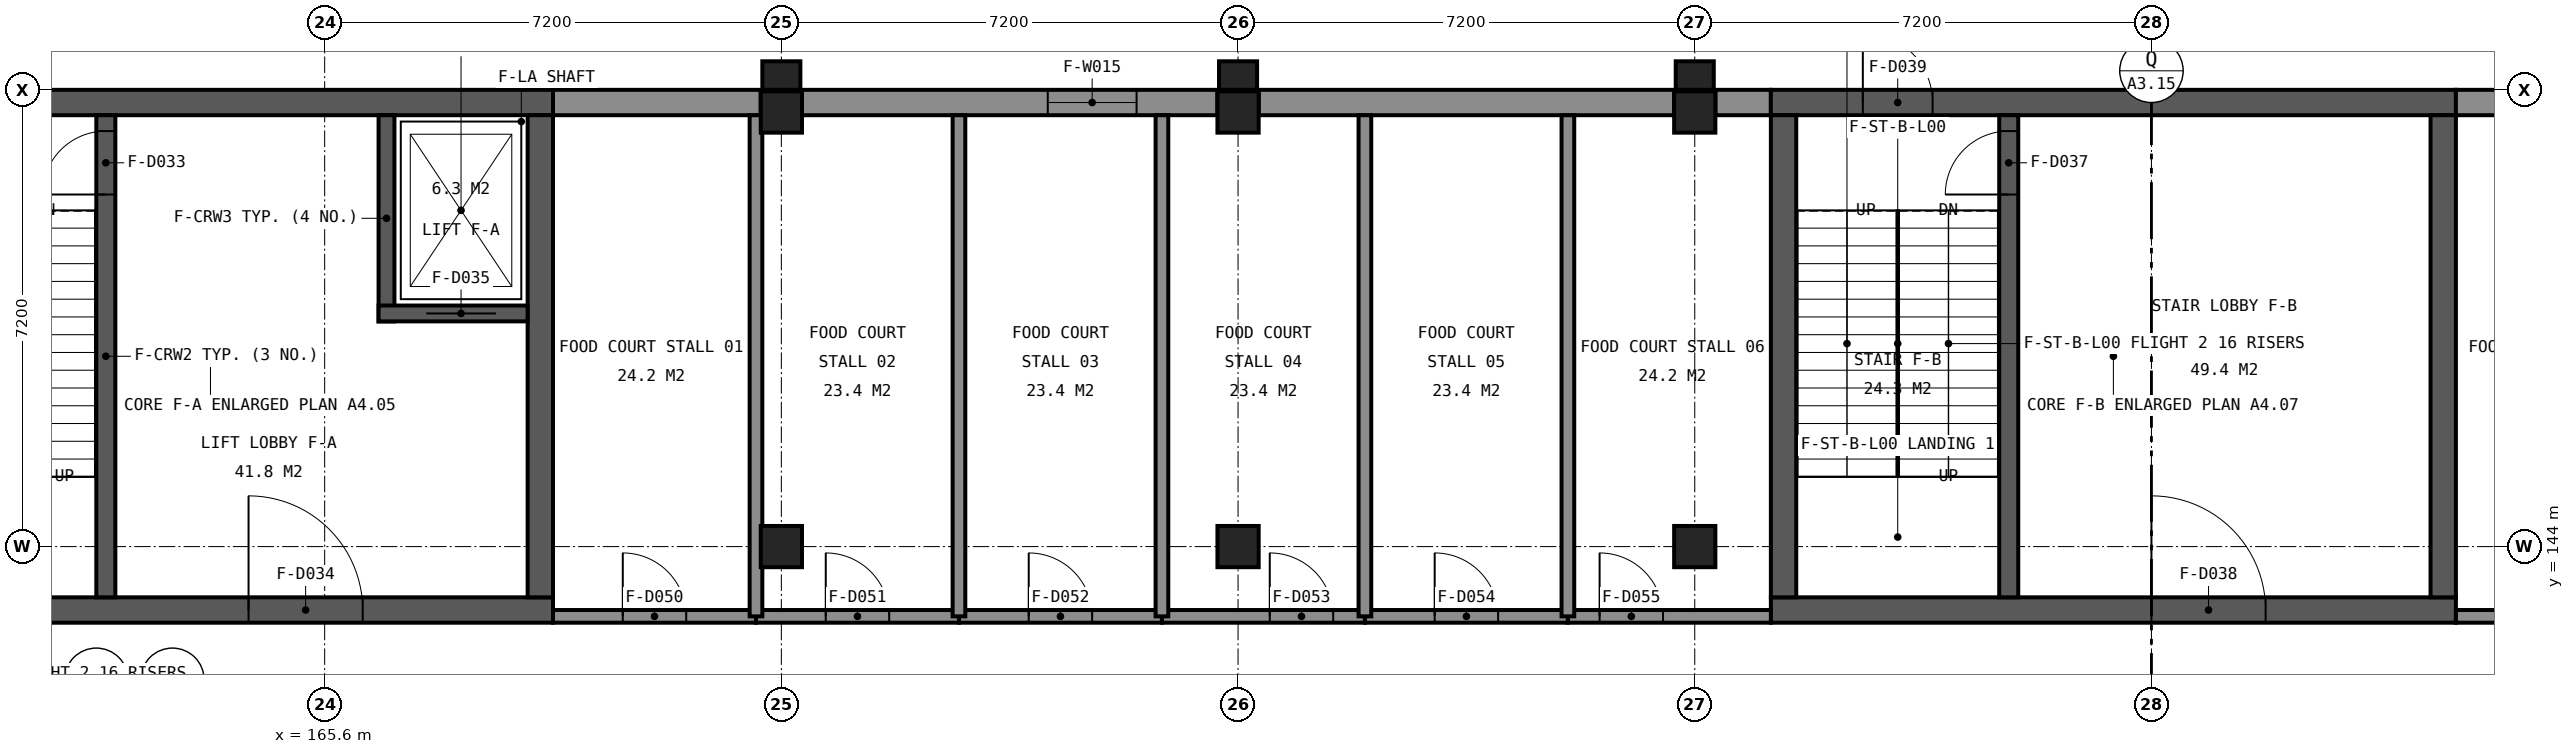
"""IFC4 building model, lengths in metres.
Left out: names, types, materials, properties, quantities, classifications, styles, units other than length and angle.
Written with IfcOpenShell. Run it as: python <this file> out.ifc"""

import sys

from ifc_helpers import new_model, si_unit, direction, frame, frame_2d, origin, origin_2d, place, context, subcontext, project, spatial, rectangle, extrude, element, fill, save


model = new_model("IFC4")
c1 = context("Model", 3, precision=1e-05, world=origin(), true_north=direction((0.0, 1.0)))
c2 = subcontext(c1, "Body", "Model", "MODEL_VIEW")
j1 = project(units=[si_unit("LENGTHUNIT", "METRE"), si_unit("PLANEANGLEUNIT", "RADIAN")], contexts=[c1])
p1 = place(None, origin())
s1 = spatial("IfcSite", under=j1, at=p1, CompositionType="ELEMENT")
p2 = place(p1, origin())
s2 = spatial("IfcBuilding", under=s1, at=p2, CompositionType="ELEMENT")
p3 = place(p2, frame((0.0, 0.0, 4.8)))
s3 = spatial("IfcBuildingStorey", under=s2, at=p3, CompositionType="ELEMENT", Elevation=4.8)
for number, where, z_axis, x_axis in (
    (1, (172.8, 144.0, 0.0), (0.0, 0.0, 1.0), (1.0, 0.0, 0.0)),
    (2, (180.0, 144.0, 0.0), (0.0, 0.0, 1.0), (1.0, 0.0, 0.0)),
    (3, (187.2, 144.0, 0.0), (0.0, 0.0, 1.0), (1.0, 0.0, 0.0)),
    (4, (172.8, 150.85, 0.0), (0.0, 0.0, 1.0), (1.0, 0.0, 0.0)),
    (5, (180.0, 150.85, 0.0), (0.0, 0.0, 1.0), (1.0, 0.0, 0.0)),
    (6, (187.2, 150.85, 0.0), (0.0, 0.0, 1.0), (1.0, 0.0, 0.0)),
):
    element("IfcColumn", number, at=place(p3, frame(where, z_axis=z_axis, x_axis=x_axis)), inside=s3, PredefinedType="COLUMN", context=c2, shape_type="SweptSolid", body=[
        extrude(rectangle(XDim=0.65, YDim=0.65, at=origin_2d()), origin(), (0.0, 0.0, 1.0), 4.8),
    ])
p4 = place(p3, frame((158.4, 151.0, 0.0), z_axis=(0.0, 0.0, 1.0), x_axis=(1.0, 0.0, 0.0)))
e7 = element("IfcWall", 7, at=p4, inside=s3, PredefinedType="SHEAR", context=c2, shape_type="SweptSolid", body=[
    extrude(rectangle(XDim=10.8, YDim=0.4, at=frame_2d((5.4, 0.0))), origin(), (0.0, 0.0, 1.0), 4.55),
])
p5 = place(p4, frame((1.45, 0.0, 0.0)))
e8 = element("IfcOpeningElement", 8, at=p5, cuts=e7, PredefinedType="OPENING", context=c2, shape_type="SweptSolid", body=[
    extrude(rectangle(XDim=1.1, YDim=2.1, at=frame_2d((0.55, 1.05))), frame((0.0, 0.21, 0.0), z_axis=(0.0, -1.0, 0.0), x_axis=(1.0, 0.0, 0.0)), (0.0, 0.0, 1.0), 0.42),
])
p6 = place(p3, frame((169.2, 151.0, 0.0), z_axis=(0.0, 0.0, 1.0), x_axis=(1.0, 0.0, 0.0)))
e9 = element("IfcWall", 9, at=p6, inside=s3, PredefinedType="SOLIDWALL", context=c2, shape_type="SweptSolid", body=[
    extrude(rectangle(XDim=3.275, YDim=0.4, at=frame_2d((1.638, 0.0))), origin(), (0.0, 0.0, 1.0), 3.95),
])
p7 = place(p3, frame((173.125, 151.0, 0.0), z_axis=(0.0, 0.0, 1.0), x_axis=(1.0, 0.0, 0.0)))
e10 = element("IfcWall", 10, at=p7, inside=s3, PredefinedType="SOLIDWALL", context=c2, shape_type="SweptSolid", body=[
    extrude(rectangle(XDim=6.55, YDim=0.4, at=frame_2d((3.275, 0.0))), origin(), (0.0, 0.0, 1.0), 3.95),
])
p8 = place(p7, frame((3.875, 0.0, 1.0)))
e11 = element("IfcOpeningElement", 11, at=p8, cuts=e10, PredefinedType="OPENING", context=c2, shape_type="SweptSolid", body=[
    extrude(rectangle(XDim=1.4, YDim=1.8, at=frame_2d((0.7, 0.9))), frame((0.0, 0.21, 0.0), z_axis=(0.0, -1.0, 0.0), x_axis=(1.0, 0.0, 0.0)), (0.0, 0.0, 1.0), 0.42),
])
p9 = place(p3, frame((180.325, 151.0, 0.0), z_axis=(0.0, 0.0, 1.0), x_axis=(1.0, 0.0, 0.0)))
e12 = element("IfcWall", 12, at=p9, inside=s3, PredefinedType="SOLIDWALL", context=c2, shape_type="SweptSolid", body=[
    extrude(rectangle(XDim=6.55, YDim=0.4, at=frame_2d((3.275, 0.0))), origin(), (0.0, 0.0, 1.0), 3.95),
])
p10 = place(p3, frame((187.525, 151.0, 0.0), z_axis=(0.0, 0.0, 1.0), x_axis=(1.0, 0.0, 0.0)))
e13 = element("IfcWall", 13, at=p10, inside=s3, PredefinedType="SOLIDWALL", context=c2, shape_type="SweptSolid", body=[
    extrude(rectangle(XDim=0.875, YDim=0.4, at=frame_2d((0.438, 0.0))), origin(), (0.0, 0.0, 1.0), 3.95),
])
p11 = place(p3, frame((188.4, 151.0, 0.0), z_axis=(0.0, 0.0, 1.0), x_axis=(1.0, 0.0, 0.0)))
e14 = element("IfcWall", 14, at=p11, inside=s3, PredefinedType="SHEAR", context=c2, shape_type="SweptSolid", body=[
    extrude(rectangle(XDim=10.8, YDim=0.4, at=frame_2d((5.4, 0.0))), origin(), (0.0, 0.0, 1.0), 4.55),
])
p12 = place(p11, frame((1.45, 0.0, 0.0)))
e15 = element("IfcOpeningElement", 15, at=p12, cuts=e14, PredefinedType="OPENING", context=c2, shape_type="SweptSolid", body=[
    extrude(rectangle(XDim=1.1, YDim=2.1, at=frame_2d((0.55, 1.05))), frame((0.0, 0.21, 0.0), z_axis=(0.0, -1.0, 0.0), x_axis=(1.0, 0.0, 0.0)), (0.0, 0.0, 1.0), 0.42),
])
p13 = place(p3, frame((199.2, 151.0, 0.0), z_axis=(0.0, 0.0, 1.0), x_axis=(1.0, 0.0, 0.0)))
e16 = element("IfcWall", 16, at=p13, inside=s3, PredefinedType="SOLIDWALL", context=c2, shape_type="SweptSolid", body=[
    extrude(rectangle(XDim=2.075, YDim=0.4, at=frame_2d((1.038, 0.0))), origin(), (0.0, 0.0, 1.0), 3.95),
])
p14 = place(p3, frame((158.4, 143.0, 0.0), z_axis=(0.0, 0.0, 1.0), x_axis=(1.0, 0.0, 0.0)))
e17 = element("IfcWall", 17, at=p14, inside=s3, PredefinedType="SHEAR", context=c2, shape_type="SweptSolid", body=[
    extrude(rectangle(XDim=10.8, YDim=0.4, at=frame_2d((5.4, 0.0))), origin(), (0.0, 0.0, 1.0), 4.55),
])
p15 = place(p14, frame((6.0, 0.0, 0.0)))
e18 = element("IfcOpeningElement", 18, at=p15, cuts=e17, PredefinedType="OPENING", context=c2, shape_type="SweptSolid", body=[
    extrude(rectangle(XDim=1.8, YDim=2.1, at=frame_2d((0.9, 1.05))), frame((0.0, 0.21, 0.0), z_axis=(0.0, -1.0, 0.0), x_axis=(1.0, 0.0, 0.0)), (0.0, 0.0, 1.0), 0.42),
])
p16 = place(p3, frame((169.0, 143.2, 0.0), z_axis=(0.0, 0.0, 1.0), x_axis=(0.0, 1.0, 0.0)))
e19 = element("IfcWall", 19, at=p16, inside=s3, PredefinedType="SHEAR", context=c2, shape_type="SweptSolid", body=[
    extrude(rectangle(XDim=7.6, YDim=0.4, at=frame_2d((3.8, 0.0))), origin(), (0.0, 0.0, 1.0), 4.55),
])
p17 = place(p3, frame((162.15, 143.2, 0.0), z_axis=(0.0, 0.0, 1.0), x_axis=(0.0, 1.0, 0.0)))
e20 = element("IfcWall", 20, at=p17, inside=s3, PredefinedType="SHEAR", context=c2, shape_type="SweptSolid", body=[
    extrude(rectangle(XDim=7.6, YDim=0.3, at=frame_2d((3.8, 0.0))), origin(), (0.0, 0.0, 1.0), 4.55),
])
p18 = place(p17, frame((6.35, 0.0, 0.0)))
e21 = element("IfcOpeningElement", 21, at=p18, cuts=e20, PredefinedType="OPENING", context=c2, shape_type="SweptSolid", body=[
    extrude(rectangle(XDim=1.0, YDim=2.1, at=frame_2d((0.5, 1.05))), frame((0.0, 0.16, 0.0), z_axis=(0.0, -1.0, 0.0), x_axis=(1.0, 0.0, 0.0)), (0.0, 0.0, 1.0), 0.32),
])
p19 = place(p3, frame((166.575, 147.55, 0.0), z_axis=(0.0, 0.0, 1.0), x_axis=(0.0, 1.0, 0.0)))
e22 = element("IfcWall", 22, at=p19, inside=s3, PredefinedType="SHEAR", context=c2, shape_type="SweptSolid", body=[
    extrude(rectangle(XDim=3.25, YDim=0.25, at=frame_2d((1.625, 0.0))), origin(), (0.0, 0.0, 1.0), 4.55),
])
p20 = place(p3, frame((166.45, 147.675, 0.0), z_axis=(0.0, 0.0, 1.0), x_axis=(1.0, 0.0, 0.0)))
e23 = element("IfcWall", 23, at=p20, inside=s3, PredefinedType="SHEAR", context=c2, shape_type="SweptSolid", body=[
    extrude(rectangle(XDim=2.35, YDim=0.25, at=frame_2d((1.175, 0.0))), origin(), (0.0, 0.0, 1.0), 4.55),
])
p21 = place(p20, frame((0.75, 0.0, 0.0)))
e24 = element("IfcOpeningElement", 24, at=p21, cuts=e23, PredefinedType="OPENING", context=c2, shape_type="SweptSolid", body=[
    extrude(rectangle(XDim=1.1, YDim=2.1, at=frame_2d((0.55, 1.05))), frame((0.0, 0.135, 0.0), z_axis=(0.0, -1.0, 0.0), x_axis=(1.0, 0.0, 0.0)), (0.0, 0.0, 1.0), 0.27),
])
p22 = place(p3, frame((188.4, 143.0, 0.0), z_axis=(0.0, 0.0, 1.0), x_axis=(1.0, 0.0, 0.0)))
e25 = element("IfcWall", 25, at=p22, inside=s3, PredefinedType="SHEAR", context=c2, shape_type="SweptSolid", body=[
    extrude(rectangle(XDim=10.8, YDim=0.4, at=frame_2d((5.4, 0.0))), origin(), (0.0, 0.0, 1.0), 4.55),
])
p23 = place(p22, frame((6.0, 0.0, 0.0)))
e26 = element("IfcOpeningElement", 26, at=p23, cuts=e25, PredefinedType="OPENING", context=c2, shape_type="SweptSolid", body=[
    extrude(rectangle(XDim=1.8, YDim=2.1, at=frame_2d((0.9, 1.05))), frame((0.0, 0.21, 0.0), z_axis=(0.0, -1.0, 0.0), x_axis=(1.0, 0.0, 0.0)), (0.0, 0.0, 1.0), 0.42),
])
for number, where, z_axis, x_axis in (
    (27, (188.6, 143.2, 0.0), (0.0, 0.0, 1.0), (0.0, 1.0, 0.0)),
    (28, (199.0, 143.2, 0.0), (0.0, 0.0, 1.0), (0.0, 1.0, 0.0)),
):
    element("IfcWall", number, at=place(p3, frame(where, z_axis=z_axis, x_axis=x_axis)), inside=s3, PredefinedType="SHEAR", context=c2, shape_type="SweptSolid", body=[
        extrude(rectangle(XDim=7.6, YDim=0.4, at=frame_2d((3.8, 0.0))), origin(), (0.0, 0.0, 1.0), 4.55),
    ])
p24 = place(p3, frame((192.15, 143.2, 0.0), z_axis=(0.0, 0.0, 1.0), x_axis=(0.0, 1.0, 0.0)))
e29 = element("IfcWall", 29, at=p24, inside=s3, PredefinedType="SHEAR", context=c2, shape_type="SweptSolid", body=[
    extrude(rectangle(XDim=7.6, YDim=0.3, at=frame_2d((3.8, 0.0))), origin(), (0.0, 0.0, 1.0), 4.55),
])
p25 = place(p24, frame((6.35, 0.0, 0.0)))
e30 = element("IfcOpeningElement", 30, at=p25, cuts=e29, PredefinedType="OPENING", context=c2, shape_type="SweptSolid", body=[
    extrude(rectangle(XDim=1.0, YDim=2.1, at=frame_2d((0.5, 1.05))), frame((0.0, 0.16, 0.0), z_axis=(0.0, -1.0, 0.0), x_axis=(1.0, 0.0, 0.0)), (0.0, 0.0, 1.0), 0.32),
])
for number, where, z_axis, x_axis in (
    (31, (172.8, 151.425, 0.0), (0.0, 0.0, 1.0), (1.0, 0.0, 0.0)),
    (32, (180.0, 151.425, 0.0), (0.0, 0.0, 1.0), (1.0, 0.0, 0.0)),
    (33, (187.2, 151.425, 0.0), (0.0, 0.0, 1.0), (1.0, 0.0, 0.0)),
):
    element("IfcColumn", number, at=place(p3, frame(where, z_axis=z_axis, x_axis=x_axis)), inside=s3, PredefinedType="PILASTER", context=c2, shape_type="SweptSolid", body=[
        extrude(rectangle(XDim=0.6, YDim=0.45, at=origin_2d()), origin(), (0.0, 0.0, 1.0), 4.8),
    ])
p26 = place(p3, frame((169.2, 142.9, 0.0), z_axis=(0.0, 0.0, 1.0), x_axis=(1.0, 0.0, 0.0)))
e34 = element("IfcWall", 34, at=p26, inside=s3, PredefinedType="PARTITIONING", context=c2, shape_type="SweptSolid", body=[
    extrude(rectangle(XDim=3.2, YDim=0.2, at=frame_2d((1.6, 0.0))), origin(), (0.0, 0.0, 1.0), 3.95),
])
p27 = place(p26, frame((1.1, 0.0, 0.0)))
e35 = element("IfcOpeningElement", 35, at=p27, cuts=e34, PredefinedType="OPENING", context=c2, shape_type="SweptSolid", body=[
    extrude(rectangle(XDim=1.0, YDim=2.1, at=frame_2d((0.5, 1.05))), frame((0.0, 0.11, 0.0), z_axis=(0.0, -1.0, 0.0), x_axis=(1.0, 0.0, 0.0)), (0.0, 0.0, 1.0), 0.22),
])
p28 = place(p3, frame((172.4, 142.9, 0.0), z_axis=(0.0, 0.0, 1.0), x_axis=(1.0, 0.0, 0.0)))
e36 = element("IfcWall", 36, at=p28, inside=s3, PredefinedType="PARTITIONING", context=c2, shape_type="SweptSolid", body=[
    extrude(rectangle(XDim=3.2, YDim=0.2, at=frame_2d((1.6, 0.0))), origin(), (0.0, 0.0, 1.0), 3.95),
])
p29 = place(p28, frame((1.1, 0.0, 0.0)))
e37 = element("IfcOpeningElement", 37, at=p29, cuts=e36, PredefinedType="OPENING", context=c2, shape_type="SweptSolid", body=[
    extrude(rectangle(XDim=1.0, YDim=2.1, at=frame_2d((0.5, 1.05))), frame((0.0, 0.11, 0.0), z_axis=(0.0, -1.0, 0.0), x_axis=(1.0, 0.0, 0.0)), (0.0, 0.0, 1.0), 0.22),
])
p30 = place(p3, frame((175.6, 142.9, 0.0), z_axis=(0.0, 0.0, 1.0), x_axis=(1.0, 0.0, 0.0)))
e38 = element("IfcWall", 38, at=p30, inside=s3, PredefinedType="PARTITIONING", context=c2, shape_type="SweptSolid", body=[
    extrude(rectangle(XDim=3.2, YDim=0.2, at=frame_2d((1.6, 0.0))), origin(), (0.0, 0.0, 1.0), 3.95),
])
p31 = place(p30, frame((1.1, 0.0, 0.0)))
e39 = element("IfcOpeningElement", 39, at=p31, cuts=e38, PredefinedType="OPENING", context=c2, shape_type="SweptSolid", body=[
    extrude(rectangle(XDim=1.0, YDim=2.1, at=frame_2d((0.5, 1.05))), frame((0.0, 0.11, 0.0), z_axis=(0.0, -1.0, 0.0), x_axis=(1.0, 0.0, 0.0)), (0.0, 0.0, 1.0), 0.22),
])
p32 = place(p3, frame((178.8, 142.9, 0.0), z_axis=(0.0, 0.0, 1.0), x_axis=(1.0, 0.0, 0.0)))
e40 = element("IfcWall", 40, at=p32, inside=s3, PredefinedType="PARTITIONING", context=c2, shape_type="SweptSolid", body=[
    extrude(rectangle(XDim=3.2, YDim=0.2, at=frame_2d((1.6, 0.0))), origin(), (0.0, 0.0, 1.0), 3.95),
])
p33 = place(p32, frame((1.7, 0.0, 0.0)))
e41 = element("IfcOpeningElement", 41, at=p33, cuts=e40, PredefinedType="OPENING", context=c2, shape_type="SweptSolid", body=[
    extrude(rectangle(XDim=1.0, YDim=2.1, at=frame_2d((0.5, 1.05))), frame((0.0, 0.11, 0.0), z_axis=(0.0, -1.0, 0.0), x_axis=(1.0, 0.0, 0.0)), (0.0, 0.0, 1.0), 0.22),
])
p34 = place(p3, frame((182.0, 142.9, 0.0), z_axis=(0.0, 0.0, 1.0), x_axis=(1.0, 0.0, 0.0)))
e42 = element("IfcWall", 42, at=p34, inside=s3, PredefinedType="PARTITIONING", context=c2, shape_type="SweptSolid", body=[
    extrude(rectangle(XDim=3.2, YDim=0.2, at=frame_2d((1.6, 0.0))), origin(), (0.0, 0.0, 1.0), 3.95),
])
p35 = place(p34, frame((1.1, 0.0, 0.0)))
e43 = element("IfcOpeningElement", 43, at=p35, cuts=e42, PredefinedType="OPENING", context=c2, shape_type="SweptSolid", body=[
    extrude(rectangle(XDim=1.0, YDim=2.1, at=frame_2d((0.5, 1.05))), frame((0.0, 0.11, 0.0), z_axis=(0.0, -1.0, 0.0), x_axis=(1.0, 0.0, 0.0)), (0.0, 0.0, 1.0), 0.22),
])
p36 = place(p3, frame((185.2, 142.9, 0.0), z_axis=(0.0, 0.0, 1.0), x_axis=(1.0, 0.0, 0.0)))
e44 = element("IfcWall", 44, at=p36, inside=s3, PredefinedType="PARTITIONING", context=c2, shape_type="SweptSolid", body=[
    extrude(rectangle(XDim=3.2, YDim=0.2, at=frame_2d((1.6, 0.0))), origin(), (0.0, 0.0, 1.0), 3.95),
])
p37 = place(p36, frame((0.5, 0.0, 0.0)))
e45 = element("IfcOpeningElement", 45, at=p37, cuts=e44, PredefinedType="OPENING", context=c2, shape_type="SweptSolid", body=[
    extrude(rectangle(XDim=1.0, YDim=2.1, at=frame_2d((0.5, 1.05))), frame((0.0, 0.11, 0.0), z_axis=(0.0, -1.0, 0.0), x_axis=(1.0, 0.0, 0.0)), (0.0, 0.0, 1.0), 0.22),
])
p38 = place(p3, frame((199.2, 142.9, 0.0), z_axis=(0.0, 0.0, 1.0), x_axis=(1.0, 0.0, 0.0)))
e46 = element("IfcWall", 46, at=p38, inside=s3, PredefinedType="PARTITIONING", context=c2, shape_type="SweptSolid", body=[
    extrude(rectangle(XDim=3.4, YDim=0.2, at=frame_2d((1.7, 0.0))), origin(), (0.0, 0.0, 1.0), 3.95),
])
p39 = place(p38, frame((0.9, 0.0, 0.0)))
e47 = element("IfcOpeningElement", 47, at=p39, cuts=e46, PredefinedType="OPENING", context=c2, shape_type="SweptSolid", body=[
    extrude(rectangle(XDim=1.0, YDim=2.1, at=frame_2d((0.5, 1.05))), frame((0.0, 0.11, 0.0), z_axis=(0.0, -1.0, 0.0), x_axis=(1.0, 0.0, 0.0)), (0.0, 0.0, 1.0), 0.22),
])
for number, where, z_axis, x_axis in (
    (48, (172.4, 142.9, 0.0), (0.0, 0.0, 1.0), (0.0, 1.0, 0.0)),
    (49, (175.6, 142.9, 0.0), (0.0, 0.0, 1.0), (0.0, 1.0, 0.0)),
    (50, (178.8, 142.9, 0.0), (0.0, 0.0, 1.0), (0.0, 1.0, 0.0)),
    (51, (182.0, 142.9, 0.0), (0.0, 0.0, 1.0), (0.0, 1.0, 0.0)),
    (52, (185.2, 142.9, 0.0), (0.0, 0.0, 1.0), (0.0, 1.0, 0.0)),
):
    element("IfcWall", number, at=place(p3, frame(where, z_axis=z_axis, x_axis=x_axis)), inside=s3, PredefinedType="PARTITIONING", context=c2, shape_type="SweptSolid", body=[
        extrude(rectangle(XDim=7.9, YDim=0.2, at=frame_2d((3.95, 0.0))), origin(), (0.0, 0.0, 1.0), 3.95),
    ])
p40 = place(p8, origin())
e53 = element("IfcWindow", 53, at=p40, inside=s3, PartitioningType="SINGLE_PANEL", PredefinedType="WINDOW", context=c2, shape_type="SweptSolid", body=[
    extrude(rectangle(XDim=1.4, YDim=1.8, at=frame_2d((0.7, 0.9))), frame((0.0, -0.09, 0.0), z_axis=(0.0, -1.0, 0.0), x_axis=(1.0, 0.0, 0.0)), (0.0, 0.0, 1.0), 0.06),
])
fill(e11, e53)
p41 = place(p18, origin())
e54 = element("IfcDoor", 54, at=p41, inside=s3, OperationType="NOTDEFINED", PredefinedType="DOOR", context=c2, shape_type="SweptSolid", body=[
    extrude(rectangle(XDim=1.0, YDim=2.1, at=frame_2d((0.5, 1.05))), frame((0.0, 0.025, 0.0), z_axis=(0.0, -1.0, 0.0), x_axis=(1.0, 0.0, 0.0)), (0.0, 0.0, 1.0), 0.05),
])
fill(e21, e54)
p42 = place(p15, origin())
e55 = element("IfcDoor", 55, at=p42, inside=s3, OperationType="NOTDEFINED", PredefinedType="DOOR", context=c2, shape_type="SweptSolid", body=[
    extrude(rectangle(XDim=1.8, YDim=2.1, at=frame_2d((0.9, 1.05))), frame((0.0, 0.025, 0.0), z_axis=(0.0, -1.0, 0.0), x_axis=(1.0, 0.0, 0.0)), (0.0, 0.0, 1.0), 0.05),
])
fill(e18, e55)
p43 = place(p21, origin())
e56 = element("IfcDoor", 56, at=p43, inside=s3, OperationType="SLIDING_TO_LEFT", PredefinedType="DOOR", context=c2, shape_type="SweptSolid", body=[
    extrude(rectangle(XDim=1.1, YDim=2.1, at=frame_2d((0.55, 1.05))), frame((0.0, 0.025, 0.0), z_axis=(0.0, -1.0, 0.0), x_axis=(1.0, 0.0, 0.0)), (0.0, 0.0, 1.0), 0.05),
])
fill(e24, e56)
p44 = place(p25, origin())
e57 = element("IfcDoor", 57, at=p44, inside=s3, OperationType="NOTDEFINED", PredefinedType="DOOR", context=c2, shape_type="SweptSolid", body=[
    extrude(rectangle(XDim=1.0, YDim=2.1, at=frame_2d((0.5, 1.05))), frame((0.0, 0.025, 0.0), z_axis=(0.0, -1.0, 0.0), x_axis=(1.0, 0.0, 0.0)), (0.0, 0.0, 1.0), 0.05),
])
fill(e30, e57)
p45 = place(p23, origin())
e58 = element("IfcDoor", 58, at=p45, inside=s3, OperationType="NOTDEFINED", PredefinedType="DOOR", context=c2, shape_type="SweptSolid", body=[
    extrude(rectangle(XDim=1.8, YDim=2.1, at=frame_2d((0.9, 1.05))), frame((0.0, 0.025, 0.0), z_axis=(0.0, -1.0, 0.0), x_axis=(1.0, 0.0, 0.0)), (0.0, 0.0, 1.0), 0.05),
])
fill(e26, e58)
p46 = place(p12, origin())
e59 = element("IfcDoor", 59, at=p46, inside=s3, OperationType="NOTDEFINED", PredefinedType="DOOR", context=c2, shape_type="SweptSolid", body=[
    extrude(rectangle(XDim=1.1, YDim=2.1, at=frame_2d((0.55, 1.05))), frame((0.0, 0.025, 0.0), z_axis=(0.0, -1.0, 0.0), x_axis=(1.0, 0.0, 0.0)), (0.0, 0.0, 1.0), 0.05),
])
fill(e15, e59)
p47 = place(p27, origin())
e60 = element("IfcDoor", 60, at=p47, inside=s3, OperationType="NOTDEFINED", PredefinedType="DOOR", context=c2, shape_type="SweptSolid", body=[
    extrude(rectangle(XDim=1.0, YDim=2.1, at=frame_2d((0.5, 1.05))), frame((0.0, 0.025, 0.0), z_axis=(0.0, -1.0, 0.0), x_axis=(1.0, 0.0, 0.0)), (0.0, 0.0, 1.0), 0.05),
])
fill(e35, e60)
p48 = place(p29, origin())
e61 = element("IfcDoor", 61, at=p48, inside=s3, OperationType="NOTDEFINED", PredefinedType="DOOR", context=c2, shape_type="SweptSolid", body=[
    extrude(rectangle(XDim=1.0, YDim=2.1, at=frame_2d((0.5, 1.05))), frame((0.0, 0.025, 0.0), z_axis=(0.0, -1.0, 0.0), x_axis=(1.0, 0.0, 0.0)), (0.0, 0.0, 1.0), 0.05),
])
fill(e37, e61)
p49 = place(p31, origin())
e62 = element("IfcDoor", 62, at=p49, inside=s3, OperationType="NOTDEFINED", PredefinedType="DOOR", context=c2, shape_type="SweptSolid", body=[
    extrude(rectangle(XDim=1.0, YDim=2.1, at=frame_2d((0.5, 1.05))), frame((0.0, 0.025, 0.0), z_axis=(0.0, -1.0, 0.0), x_axis=(1.0, 0.0, 0.0)), (0.0, 0.0, 1.0), 0.05),
])
fill(e39, e62)
p50 = place(p33, origin())
e63 = element("IfcDoor", 63, at=p50, inside=s3, OperationType="NOTDEFINED", PredefinedType="DOOR", context=c2, shape_type="SweptSolid", body=[
    extrude(rectangle(XDim=1.0, YDim=2.1, at=frame_2d((0.5, 1.05))), frame((0.0, 0.025, 0.0), z_axis=(0.0, -1.0, 0.0), x_axis=(1.0, 0.0, 0.0)), (0.0, 0.0, 1.0), 0.05),
])
fill(e41, e63)
p51 = place(p35, origin())
e64 = element("IfcDoor", 64, at=p51, inside=s3, OperationType="NOTDEFINED", PredefinedType="DOOR", context=c2, shape_type="SweptSolid", body=[
    extrude(rectangle(XDim=1.0, YDim=2.1, at=frame_2d((0.5, 1.05))), frame((0.0, 0.025, 0.0), z_axis=(0.0, -1.0, 0.0), x_axis=(1.0, 0.0, 0.0)), (0.0, 0.0, 1.0), 0.05),
])
fill(e43, e64)
p52 = place(p37, origin())
e65 = element("IfcDoor", 65, at=p52, inside=s3, OperationType="NOTDEFINED", PredefinedType="DOOR", context=c2, shape_type="SweptSolid", body=[
    extrude(rectangle(XDim=1.0, YDim=2.1, at=frame_2d((0.5, 1.05))), frame((0.0, 0.025, 0.0), z_axis=(0.0, -1.0, 0.0), x_axis=(1.0, 0.0, 0.0)), (0.0, 0.0, 1.0), 0.05),
])
fill(e45, e65)
save(model, sys.argv[1])
